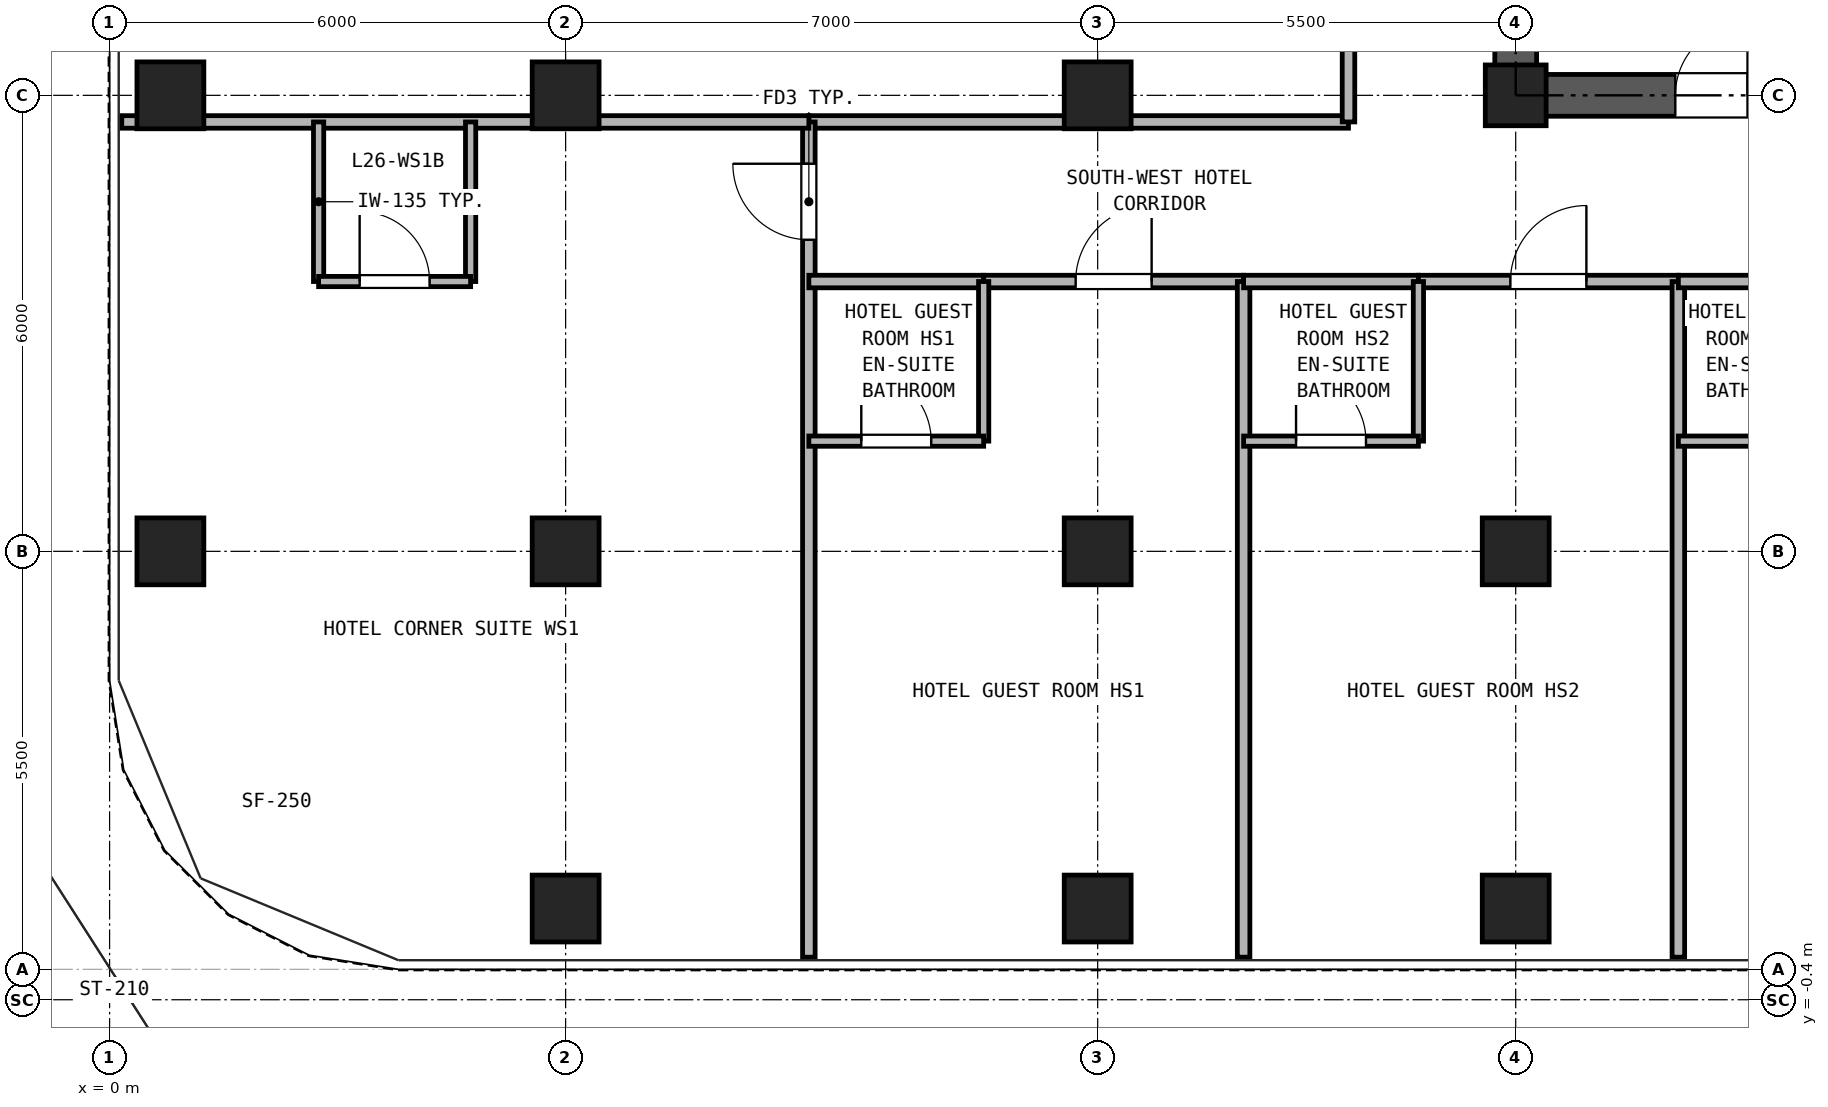
"""IFC4 building model, lengths in metres.
Left out: names, types, materials, properties, quantities, classifications, styles, units other than length and angle.
Written with IfcOpenShell. Run it as: python <this file> out.ifc"""

import sys

from ifc_helpers import new_model, si_unit, direction, frame, frame_2d, origin, origin_2d, place, context, subcontext, project, spatial, rectangle, hollow_rectangle, extrude, source, transform, mapped, element, fill, save


model = new_model("IFC4")
c1 = context("Model", 3, precision=1e-05, world=origin(), true_north=direction((0.0, 1.0)))
c2 = subcontext(c1, "Body", "Model", "MODEL_VIEW")
j1 = project(units=[si_unit("LENGTHUNIT", "METRE"), si_unit("PLANEANGLEUNIT", "RADIAN")], contexts=[c1])
p1 = place(None, origin())
s1 = spatial("IfcSite", under=j1, at=p1, CompositionType="ELEMENT")
p2 = place(p1, origin())
s2 = spatial("IfcBuilding", under=s1, at=p2, CompositionType="ELEMENT")
p3 = place(p2, frame((0.0, 0.0, 99.1)))
s3 = spatial("IfcBuildingStorey", under=s2, at=p3, CompositionType="ELEMENT", Elevation=99.1)
m1 = source(origin(), c2, "Body", "SweptSolid", [
    extrude(hollow_rectangle(XDim=0.88, YDim=0.88, WallThickness=0.05, at=origin_2d()), origin(), (0.0, 0.0, 1.0), 2.95),
])
for number, where, z_axis, x_axis in (
    (1, (6.0, 0.8, 0.0), (0.0, 0.0, 1.0), (1.0, 0.0, 0.0)),
    (2, (13.0, 0.8, 0.0), (0.0, 0.0, 1.0), (1.0, 0.0, 0.0)),
    (3, (18.5, 0.8, 0.0), (0.0, 0.0, 1.0), (1.0, 0.0, 0.0)),
    (4, (0.8, 5.5, 0.0), (0.0, 0.0, 1.0), (1.0, 0.0, 0.0)),
    (5, (0.8, 11.5, 0.0), (0.0, 0.0, 1.0), (1.0, 0.0, 0.0)),
    (6, (6.0, 5.5, 0.0), (0.0, 0.0, 1.0), (1.0, 0.0, 0.0)),
    (7, (6.0, 11.5, 0.0), (0.0, 0.0, 1.0), (1.0, 0.0, 0.0)),
    (8, (13.0, 5.5, 0.0), (0.0, 0.0, 1.0), (1.0, 0.0, 0.0)),
    (9, (13.0, 11.5, 0.0), (0.0, 0.0, 1.0), (1.0, 0.0, 0.0)),
    (10, (18.5, 5.5, 0.0), (0.0, 0.0, 1.0), (1.0, 0.0, 0.0)),
):
    element("IfcColumn", number, at=place(p3, frame(where, z_axis=z_axis, x_axis=x_axis)), inside=s3, PredefinedType="COLUMN", context=c2, shape_type="MappedRepresentation", body=[
        mapped(m1, transform((0.0, 0.0, 0.0), x_axis=(1.0, 0.0, 0.0), y_axis=(0.0, 1.0, 0.0), z_axis=(0.0, 0.0, 1.0), scale=1.0)),
    ])
m2 = source(origin(), c2, "Body", "SweptSolid", [
    extrude(hollow_rectangle(XDim=0.8, YDim=0.8, WallThickness=0.045, at=origin_2d()), origin(), (0.0, 0.0, 1.0), 2.95),
])
p4 = place(p3, frame((18.5, 11.5, 0.0), z_axis=(0.0, 0.0, 1.0), x_axis=(1.0, 0.0, 0.0)))
e11 = element("IfcColumn", 11, at=p4, inside=s3, PredefinedType="COLUMN", context=c2, shape_type="MappedRepresentation", body=[
    mapped(m2, transform((0.0, 0.0, 0.0), x_axis=(1.0, 0.0, 0.0), y_axis=(0.0, 1.0, 0.0), z_axis=(0.0, 0.0, 1.0), scale=1.0)),
])
p5 = place(p3, frame((18.225, 11.5, 0.0), z_axis=(0.0, 0.0, 1.0), x_axis=(1.0, 0.0, 0.0)))
e12 = element("IfcWall", 12, at=p5, inside=s3, PredefinedType="SHEAR", context=c2, shape_type="SweptSolid", body=[
    extrude(rectangle(XDim=10.55, YDim=0.55, at=frame_2d((5.275, 0.0))), origin(), (0.0, 0.0, 1.0), 2.95),
])
p6 = place(p5, frame((2.375, 0.0, 0.0)))
e13 = element("IfcOpeningElement", 13, at=p6, cuts=e12, PredefinedType="OPENING", context=c2, shape_type="SweptSolid", body=[
    extrude(rectangle(XDim=0.95, YDim=2.15, at=frame_2d((0.475, 1.075))), frame((0.0, 0.285, 0.0), z_axis=(0.0, -1.0, 0.0), x_axis=(1.0, 0.0, 0.0)), (0.0, 0.0, 1.0), 0.57),
])
p7 = place(p5, frame((5.875, 0.0, 0.0)))
e14 = element("IfcOpeningElement", 14, at=p7, cuts=e12, PredefinedType="OPENING", context=c2, shape_type="SweptSolid", body=[
    extrude(rectangle(XDim=1.1, YDim=2.25, at=frame_2d((0.55, 1.125))), frame((0.0, 0.285, 0.0), z_axis=(0.0, -1.0, 0.0), x_axis=(1.0, 0.0, 0.0)), (0.0, 0.0, 1.0), 0.57),
])
p8 = place(p5, frame((8.275, 0.0, 0.0)))
e15 = element("IfcOpeningElement", 15, at=p8, cuts=e12, PredefinedType="OPENING", context=c2, shape_type="SweptSolid", body=[
    extrude(rectangle(XDim=1.1, YDim=2.25, at=frame_2d((0.55, 1.125))), frame((0.0, 0.285, 0.0), z_axis=(0.0, -1.0, 0.0), x_axis=(1.0, 0.0, 0.0)), (0.0, 0.0, 1.0), 0.57),
])
p9 = place(p3, frame((18.5, 11.775, 0.0), z_axis=(0.0, 0.0, 1.0), x_axis=(0.0, 1.0, 0.0)))
e16 = element("IfcWall", 16, at=p9, inside=s3, PredefinedType="SHEAR", context=c2, shape_type="SweptSolid", body=[
    extrude(rectangle(XDim=16.7, YDim=0.55, at=frame_2d((8.35, 0.0))), origin(), (0.0, 0.0, 1.0), 2.95),
])
p10 = place(p9, frame((7.375, 0.0, 0.0)))
e17 = element("IfcOpeningElement", 17, at=p10, cuts=e16, PredefinedType="OPENING", context=c2, shape_type="SweptSolid", body=[
    extrude(rectangle(XDim=1.15, YDim=2.2, at=frame_2d((0.575, 1.1))), frame((0.0, 0.285, 0.0), z_axis=(0.0, -1.0, 0.0), x_axis=(1.0, 0.0, 0.0)), (0.0, 0.0, 1.0), 0.57),
])
p11 = place(p3, frame((9.2, 11.15, 0.0), z_axis=(0.0, 0.0, 1.0), x_axis=(1.0, 0.0, 0.0)))
e18 = element("IfcWall", 18, at=p11, inside=s3, PredefinedType="PARTITIONING", context=c2, shape_type="SweptSolid", body=[
    extrude(rectangle(XDim=7.1, YDim=0.165, at=frame_2d((3.55, 0.0))), origin(), (0.0, 0.0, 1.0), 2.95),
])
p12 = place(p3, frame((16.3, 11.15, 0.0), z_axis=(0.0, 0.0, 1.0), x_axis=(0.0, 1.0, 0.0)))
e19 = element("IfcWall", 19, at=p12, inside=s3, PredefinedType="PARTITIONING", context=c2, shape_type="SweptSolid", body=[
    extrude(rectangle(XDim=18.6, YDim=0.165, at=frame_2d((9.3, 0.0))), origin(), (0.0, 0.0, 1.0), 2.95),
])
p13 = place(p12, frame((8.8, 0.0, 0.0)))
e20 = element("IfcOpeningElement", 20, at=p13, cuts=e19, PredefinedType="OPENING", context=c2, shape_type="SweptSolid", body=[
    extrude(rectangle(XDim=0.95, YDim=2.15, at=frame_2d((0.475, 1.075))), frame((0.0, 0.093, 0.0), z_axis=(0.0, -1.0, 0.0), x_axis=(1.0, 0.0, 0.0)), (0.0, 0.0, 1.0), 0.185),
])
p14 = place(p3, frame((9.2, 0.16, 0.0), z_axis=(0.0, 0.0, 1.0), x_axis=(0.0, 1.0, 0.0)))
e21 = element("IfcWall", 21, at=p14, inside=s3, PredefinedType="PARTITIONING", context=c2, shape_type="SweptSolid", body=[
    extrude(rectangle(XDim=10.99, YDim=0.165, at=frame_2d((5.495, 0.0))), origin(), (0.0, 0.0, 1.0), 2.95),
])
p15 = place(p14, frame((9.44, 0.0, 0.0)))
e22 = element("IfcOpeningElement", 22, at=p15, cuts=e21, PredefinedType="OPENING", context=c2, shape_type="SweptSolid", body=[
    extrude(rectangle(XDim=1.0, YDim=2.15, at=frame_2d((0.5, 1.075))), frame((0.0, 0.093, 0.0), z_axis=(0.0, -1.0, 0.0), x_axis=(1.0, 0.0, 0.0)), (0.0, 0.0, 1.0), 0.185),
])
p16 = place(p3, frame((0.16, 11.15, 0.0), z_axis=(0.0, 0.0, 1.0), x_axis=(1.0, 0.0, 0.0)))
e23 = element("IfcWall", 23, at=p16, inside=s3, PredefinedType="PARTITIONING", context=c2, shape_type="SweptSolid", body=[
    extrude(rectangle(XDim=9.04, YDim=0.165, at=frame_2d((4.52, 0.0))), origin(), (0.0, 0.0, 1.0), 2.95),
])
for number, where, z_axis, x_axis in (
    (24, (2.75, 9.05, 0.0), (0.0, 0.0, 1.0), (0.0, 1.0, 0.0)),
    (25, (4.75, 9.05, 0.0), (0.0, 0.0, 1.0), (0.0, 1.0, 0.0)),
):
    element("IfcWall", number, at=place(p3, frame(where, z_axis=z_axis, x_axis=x_axis)), inside=s3, PredefinedType="PARTITIONING", context=c2, shape_type="SweptSolid", body=[
        extrude(rectangle(XDim=2.1, YDim=0.135, at=frame_2d((1.05, 0.0))), origin(), (0.0, 0.0, 1.0), 2.95),
    ])
p17 = place(p3, frame((2.75, 9.05, 0.0), z_axis=(0.0, 0.0, 1.0), x_axis=(1.0, 0.0, 0.0)))
e26 = element("IfcWall", 26, at=p17, inside=s3, PredefinedType="PARTITIONING", context=c2, shape_type="SweptSolid", body=[
    extrude(rectangle(XDim=2.0, YDim=0.135, at=frame_2d((1.0, 0.0))), origin(), (0.0, 0.0, 1.0), 2.95),
])
p18 = place(p17, frame((0.54, 0.0, 0.0)))
e27 = element("IfcOpeningElement", 27, at=p18, cuts=e26, PredefinedType="OPENING", context=c2, shape_type="SweptSolid", body=[
    extrude(rectangle(XDim=0.92, YDim=2.1, at=frame_2d((0.46, 1.05))), frame((0.0, 0.077, 0.0), z_axis=(0.0, -1.0, 0.0), x_axis=(1.0, 0.0, 0.0)), (0.0, 0.0, 1.0), 0.155),
])
p19 = place(p3, frame((9.2, 9.05, 0.0), z_axis=(0.0, 0.0, 1.0), x_axis=(1.0, 0.0, 0.0)))
e28 = element("IfcWall", 28, at=p19, inside=s3, PredefinedType="PARTITIONING", context=c2, shape_type="SweptSolid", body=[
    extrude(rectangle(XDim=2.3, YDim=0.165, at=frame_2d((1.15, 0.0))), origin(), (0.0, 0.0, 1.0), 2.95),
])
p20 = place(p3, frame((11.5, 9.05, 0.0), z_axis=(0.0, 0.0, 1.0), x_axis=(1.0, 0.0, 0.0)))
e29 = element("IfcWall", 29, at=p20, inside=s3, PredefinedType="PARTITIONING", context=c2, shape_type="SweptSolid", body=[
    extrude(rectangle(XDim=3.42, YDim=0.165, at=frame_2d((1.71, 0.0))), origin(), (0.0, 0.0, 1.0), 2.95),
])
p21 = place(p20, frame((1.21, 0.0, 0.0)))
e30 = element("IfcOpeningElement", 30, at=p21, cuts=e29, PredefinedType="OPENING", context=c2, shape_type="SweptSolid", body=[
    extrude(rectangle(XDim=1.0, YDim=2.15, at=frame_2d((0.5, 1.075))), frame((0.0, 0.093, 0.0), z_axis=(0.0, -1.0, 0.0), x_axis=(1.0, 0.0, 0.0)), (0.0, 0.0, 1.0), 0.185),
])
p22 = place(p3, frame((11.5, 6.95, 0.0), z_axis=(0.0, 0.0, 1.0), x_axis=(0.0, 1.0, 0.0)))
e31 = element("IfcWall", 31, at=p22, inside=s3, PredefinedType="PARTITIONING", context=c2, shape_type="SweptSolid", body=[
    extrude(rectangle(XDim=2.1, YDim=0.135, at=frame_2d((1.05, 0.0))), origin(), (0.0, 0.0, 1.0), 2.95),
])
p23 = place(p3, frame((9.2, 6.95, 0.0), z_axis=(0.0, 0.0, 1.0), x_axis=(1.0, 0.0, 0.0)))
e32 = element("IfcWall", 32, at=p23, inside=s3, PredefinedType="PARTITIONING", context=c2, shape_type="SweptSolid", body=[
    extrude(rectangle(XDim=2.3, YDim=0.135, at=frame_2d((1.15, 0.0))), origin(), (0.0, 0.0, 1.0), 2.95),
])
p24 = place(p23, frame((0.69, 0.0, 0.0)))
e33 = element("IfcOpeningElement", 33, at=p24, cuts=e32, PredefinedType="OPENING", context=c2, shape_type="SweptSolid", body=[
    extrude(rectangle(XDim=0.92, YDim=2.1, at=frame_2d((0.46, 1.05))), frame((0.0, 0.077, 0.0), z_axis=(0.0, -1.0, 0.0), x_axis=(1.0, 0.0, 0.0)), (0.0, 0.0, 1.0), 0.155),
])
p25 = place(p3, frame((14.92, 0.16, 0.0), z_axis=(0.0, 0.0, 1.0), x_axis=(0.0, 1.0, 0.0)))
e34 = element("IfcWall", 34, at=p25, inside=s3, PredefinedType="PARTITIONING", context=c2, shape_type="SweptSolid", body=[
    extrude(rectangle(XDim=8.89, YDim=0.165, at=frame_2d((4.445, 0.0))), origin(), (0.0, 0.0, 1.0), 2.95),
])
p26 = place(p3, frame((14.92, 9.05, 0.0), z_axis=(0.0, 0.0, 1.0), x_axis=(1.0, 0.0, 0.0)))
e35 = element("IfcWall", 35, at=p26, inside=s3, PredefinedType="PARTITIONING", context=c2, shape_type="SweptSolid", body=[
    extrude(rectangle(XDim=2.3, YDim=0.165, at=frame_2d((1.15, 0.0))), origin(), (0.0, 0.0, 1.0), 2.95),
])
p27 = place(p3, frame((17.22, 9.05, 0.0), z_axis=(0.0, 0.0, 1.0), x_axis=(1.0, 0.0, 0.0)))
e36 = element("IfcWall", 36, at=p27, inside=s3, PredefinedType="PARTITIONING", context=c2, shape_type="SweptSolid", body=[
    extrude(rectangle(XDim=3.42, YDim=0.165, at=frame_2d((1.71, 0.0))), origin(), (0.0, 0.0, 1.0), 2.95),
])
p28 = place(p27, frame((1.21, 0.0, 0.0)))
e37 = element("IfcOpeningElement", 37, at=p28, cuts=e36, PredefinedType="OPENING", context=c2, shape_type="SweptSolid", body=[
    extrude(rectangle(XDim=1.0, YDim=2.15, at=frame_2d((0.5, 1.075))), frame((0.0, 0.093, 0.0), z_axis=(0.0, -1.0, 0.0), x_axis=(1.0, 0.0, 0.0)), (0.0, 0.0, 1.0), 0.185),
])
p29 = place(p3, frame((17.22, 6.95, 0.0), z_axis=(0.0, 0.0, 1.0), x_axis=(0.0, 1.0, 0.0)))
e38 = element("IfcWall", 38, at=p29, inside=s3, PredefinedType="PARTITIONING", context=c2, shape_type="SweptSolid", body=[
    extrude(rectangle(XDim=2.1, YDim=0.135, at=frame_2d((1.05, 0.0))), origin(), (0.0, 0.0, 1.0), 2.95),
])
p30 = place(p3, frame((14.92, 6.95, 0.0), z_axis=(0.0, 0.0, 1.0), x_axis=(1.0, 0.0, 0.0)))
e39 = element("IfcWall", 39, at=p30, inside=s3, PredefinedType="PARTITIONING", context=c2, shape_type="SweptSolid", body=[
    extrude(rectangle(XDim=2.3, YDim=0.135, at=frame_2d((1.15, 0.0))), origin(), (0.0, 0.0, 1.0), 2.95),
])
p31 = place(p30, frame((0.69, 0.0, 0.0)))
e40 = element("IfcOpeningElement", 40, at=p31, cuts=e39, PredefinedType="OPENING", context=c2, shape_type="SweptSolid", body=[
    extrude(rectangle(XDim=0.92, YDim=2.1, at=frame_2d((0.46, 1.05))), frame((0.0, 0.077, 0.0), z_axis=(0.0, -1.0, 0.0), x_axis=(1.0, 0.0, 0.0)), (0.0, 0.0, 1.0), 0.155),
])
p32 = place(p3, frame((20.64, 0.16, 0.0), z_axis=(0.0, 0.0, 1.0), x_axis=(0.0, 1.0, 0.0)))
e41 = element("IfcWall", 41, at=p32, inside=s3, PredefinedType="PARTITIONING", context=c2, shape_type="SweptSolid", body=[
    extrude(rectangle(XDim=8.89, YDim=0.165, at=frame_2d((4.445, 0.0))), origin(), (0.0, 0.0, 1.0), 2.95),
])
p33 = place(p3, frame((20.64, 9.05, 0.0), z_axis=(0.0, 0.0, 1.0), x_axis=(1.0, 0.0, 0.0)))
e42 = element("IfcWall", 42, at=p33, inside=s3, PredefinedType="PARTITIONING", context=c2, shape_type="SweptSolid", body=[
    extrude(rectangle(XDim=2.3, YDim=0.165, at=frame_2d((1.15, 0.0))), origin(), (0.0, 0.0, 1.0), 2.95),
])
p34 = place(p3, frame((20.64, 6.95, 0.0), z_axis=(0.0, 0.0, 1.0), x_axis=(1.0, 0.0, 0.0)))
e43 = element("IfcWall", 43, at=p34, inside=s3, PredefinedType="PARTITIONING", context=c2, shape_type="SweptSolid", body=[
    extrude(rectangle(XDim=2.3, YDim=0.135, at=frame_2d((1.15, 0.0))), origin(), (0.0, 0.0, 1.0), 2.95),
])
p35 = place(p6, frame((0.95, 0.0, 0.0), z_axis=(0.0, 0.0, 1.0), x_axis=(-1.0, 0.0, 0.0)))
e44 = element("IfcDoor", 44, at=p35, inside=s3, OperationType="SINGLE_SWING_RIGHT", PredefinedType="DOOR", context=c2, shape_type="SweptSolid", body=[
    extrude(rectangle(XDim=0.95, YDim=2.15, at=frame_2d((0.475, 1.075))), frame((0.0, 0.025, 0.0), z_axis=(0.0, -1.0, 0.0), x_axis=(1.0, 0.0, 0.0)), (0.0, 0.0, 1.0), 0.05),
])
fill(e13, e44)
p36 = place(p18, origin())
e45 = element("IfcDoor", 45, at=p36, inside=s3, OperationType="SINGLE_SWING_LEFT", PredefinedType="DOOR", context=c2, shape_type="SweptSolid", body=[
    extrude(rectangle(XDim=0.92, YDim=2.1, at=frame_2d((0.46, 1.05))), frame((0.0, 0.025, 0.0), z_axis=(0.0, -1.0, 0.0), x_axis=(1.0, 0.0, 0.0)), (0.0, 0.0, 1.0), 0.05),
])
fill(e27, e45)
p37 = place(p15, origin())
e46 = element("IfcDoor", 46, at=p37, inside=s3, OperationType="SINGLE_SWING_RIGHT", PredefinedType="DOOR", context=c2, shape_type="SweptSolid", body=[
    extrude(rectangle(XDim=1.0, YDim=2.15, at=frame_2d((0.5, 1.075))), frame((0.0, 0.025, 0.0), z_axis=(0.0, -1.0, 0.0), x_axis=(1.0, 0.0, 0.0)), (0.0, 0.0, 1.0), 0.05),
])
fill(e22, e46)
p38 = place(p24, origin())
e47 = element("IfcDoor", 47, at=p38, inside=s3, OperationType="SINGLE_SWING_LEFT", PredefinedType="DOOR", context=c2, shape_type="SweptSolid", body=[
    extrude(rectangle(XDim=0.92, YDim=2.1, at=frame_2d((0.46, 1.05))), frame((0.0, 0.025, 0.0), z_axis=(0.0, -1.0, 0.0), x_axis=(1.0, 0.0, 0.0)), (0.0, 0.0, 1.0), 0.05),
])
fill(e33, e47)
p39 = place(p21, frame((1.0, 0.0, 0.0), z_axis=(0.0, 0.0, 1.0), x_axis=(-1.0, 0.0, 0.0)))
e48 = element("IfcDoor", 48, at=p39, inside=s3, OperationType="SINGLE_SWING_RIGHT", PredefinedType="DOOR", context=c2, shape_type="SweptSolid", body=[
    extrude(rectangle(XDim=1.0, YDim=2.15, at=frame_2d((0.5, 1.075))), frame((0.0, 0.025, 0.0), z_axis=(0.0, -1.0, 0.0), x_axis=(1.0, 0.0, 0.0)), (0.0, 0.0, 1.0), 0.05),
])
fill(e30, e48)
p40 = place(p31, origin())
e49 = element("IfcDoor", 49, at=p40, inside=s3, OperationType="SINGLE_SWING_LEFT", PredefinedType="DOOR", context=c2, shape_type="SweptSolid", body=[
    extrude(rectangle(XDim=0.92, YDim=2.1, at=frame_2d((0.46, 1.05))), frame((0.0, 0.025, 0.0), z_axis=(0.0, -1.0, 0.0), x_axis=(1.0, 0.0, 0.0)), (0.0, 0.0, 1.0), 0.05),
])
fill(e40, e49)
p41 = place(p28, frame((1.0, 0.0, 0.0), z_axis=(0.0, 0.0, 1.0), x_axis=(-1.0, 0.0, 0.0)))
e50 = element("IfcDoor", 50, at=p41, inside=s3, OperationType="SINGLE_SWING_RIGHT", PredefinedType="DOOR", context=c2, shape_type="SweptSolid", body=[
    extrude(rectangle(XDim=1.0, YDim=2.15, at=frame_2d((0.5, 1.075))), frame((0.0, 0.025, 0.0), z_axis=(0.0, -1.0, 0.0), x_axis=(1.0, 0.0, 0.0)), (0.0, 0.0, 1.0), 0.05),
])
fill(e37, e50)
save(model, sys.argv[1])
